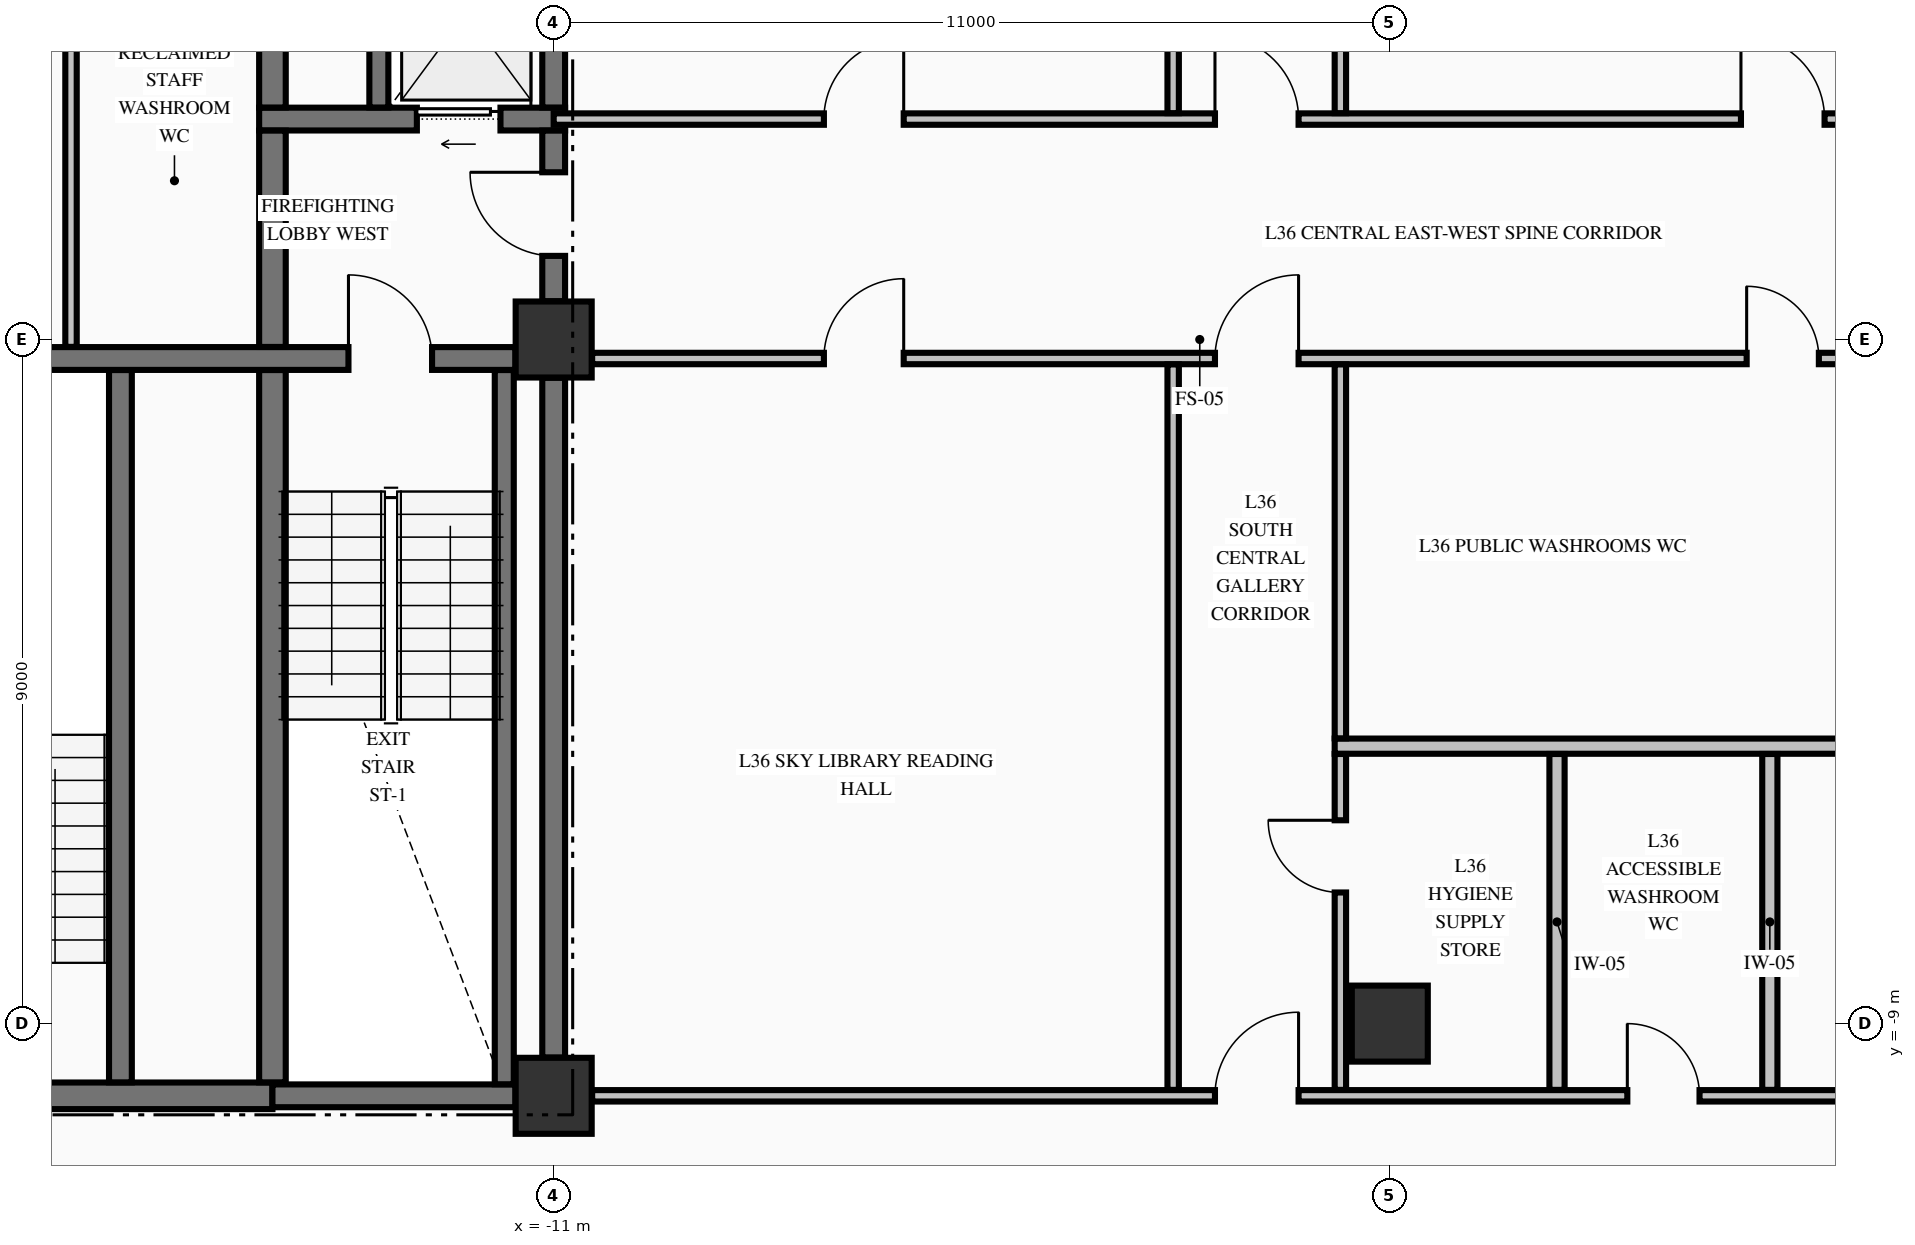
"""IFC4 building model, lengths in metres.
Left out: names, types, materials, properties, quantities, classifications, styles, units other than length and angle.
Written with IfcOpenShell. Run it as: python <this file> out.ifc"""

import sys

from ifc_helpers import new_model, si_unit, direction, frame, frame_2d, origin, origin_2d, place, context, subcontext, project, spatial, rectangle, extrude, element, fill, save


model = new_model("IFC4")
c1 = context("Model", 3, precision=1e-05, world=origin(), true_north=direction((0.0, 1.0)))
c2 = subcontext(c1, "Body", "Model", "MODEL_VIEW")
j1 = project(units=[si_unit("LENGTHUNIT", "METRE"), si_unit("PLANEANGLEUNIT", "RADIAN")], contexts=[c1])
p1 = place(None, origin())
s1 = spatial("IfcSite", under=j1, at=p1, CompositionType="ELEMENT")
p2 = place(p1, origin())
s2 = spatial("IfcBuilding", under=s1, at=p2, CompositionType="ELEMENT")
p3 = place(p2, frame((0.0, 0.0, 142.77)))
s3 = spatial("IfcBuildingStorey", under=s2, at=p3, CompositionType="ELEMENT", Elevation=142.77)
for number, where, z_axis, x_axis in (
    (1, (-11.0, -9.95, -0.325), (0.0, 0.0, 1.0), (1.0, 0.0, 0.0)),
    (2, (-11.0, 0.0, -0.325), (0.0, 0.0, 1.0), (1.0, 0.0, 0.0)),
    (3, (0.0, -9.0, -0.325), (0.0, 0.0, 1.0), (1.0, 0.0, 0.0)),
):
    element("IfcColumn", number, at=place(p3, frame(where, z_axis=z_axis, x_axis=x_axis)), inside=s3, PredefinedType="COLUMN", context=c2, shape_type="SweptSolid", body=[
        extrude(rectangle(XDim=1.0, YDim=1.0, at=origin_2d()), origin(), (0.0, 0.0, 1.0), 3.645),
    ])
p4 = place(p3, frame((-19.496, -9.95, 0.0), z_axis=(0.0, 0.0, 1.0), x_axis=(1.0, 0.0, 0.0)))
e4 = element("IfcWall", 4, at=p4, inside=s3, PredefinedType="SHEAR", context=c2, shape_type="SweptSolid", body=[
    extrude(rectangle(XDim=4.796, YDim=0.35, at=frame_2d((2.398, 0.0))), origin(), (0.0, 0.0, 1.0), 3.32),
])
p5 = place(p4, frame((0.671, 0.0, 0.0)))
e5 = element("IfcOpeningElement", 5, at=p5, cuts=e4, PredefinedType="OPENING", context=c2, shape_type="SweptSolid", body=[
    extrude(rectangle(XDim=1.05, YDim=2.15, at=frame_2d((0.525, 1.075))), frame((0.0, 0.185, 0.0), z_axis=(0.0, -1.0, 0.0), x_axis=(1.0, 0.0, 0.0)), (0.0, 0.0, 1.0), 0.37),
])
p6 = place(p3, frame((-14.7, -9.95, 0.0), z_axis=(0.0, 0.0, 1.0), x_axis=(1.0, 0.0, 0.0)))
e6 = element("IfcWall", 6, at=p6, inside=s3, PredefinedType="SHEAR", context=c2, shape_type="SweptSolid", body=[
    extrude(rectangle(XDim=3.196, YDim=0.3, at=frame_2d((1.598, 0.0))), origin(), (0.0, 0.0, 1.0), 3.32),
])
p7 = place(p3, frame((-19.496, -0.25, 0.0), z_axis=(0.0, 0.0, 1.0), x_axis=(1.0, 0.0, 0.0)))
e7 = element("IfcWall", 7, at=p7, inside=s3, PredefinedType="SHEAR", context=c2, shape_type="SweptSolid", body=[
    extrude(rectangle(XDim=7.992, YDim=0.3, at=frame_2d((3.996, 0.0))), origin(), (0.0, 0.0, 1.0), 3.32),
])
p8 = place(p7, frame((5.796, 0.0, 0.0)))
e8 = element("IfcOpeningElement", 8, at=p8, cuts=e7, PredefinedType="OPENING", context=c2, shape_type="SweptSolid", body=[
    extrude(rectangle(XDim=1.1, YDim=2.15, at=frame_2d((0.55, 1.075))), frame((0.0, 0.16, 0.0), z_axis=(0.0, -1.0, 0.0), x_axis=(1.0, 0.0, 0.0)), (0.0, 0.0, 1.0), 0.32),
])
p9 = place(p3, frame((-14.875, 2.9, 0.0), z_axis=(0.0, 0.0, 1.0), x_axis=(1.0, 0.0, 0.0)))
e9 = element("IfcWall", 9, at=p9, inside=s3, PredefinedType="SHEAR", context=c2, shape_type="SweptSolid", body=[
    extrude(rectangle(XDim=4.025, YDim=0.3, at=frame_2d((2.012, 0.0))), origin(), (0.0, 0.0, 1.0), 3.32),
])
p10 = place(p9, frame((2.075, 0.0, 0.0)))
e10 = element("IfcOpeningElement", 10, at=p10, cuts=e9, PredefinedType="OPENING", context=c2, shape_type="SweptSolid", body=[
    extrude(rectangle(XDim=1.1, YDim=2.2, at=frame_2d((0.55, 1.1))), frame((0.0, 0.16, 0.0), z_axis=(0.0, -1.0, 0.0), x_axis=(1.0, 0.0, 0.0)), (0.0, 0.0, 1.0), 0.32),
])
p11 = place(p3, frame((-10.494, -9.95, 0.0), z_axis=(0.0, 0.0, 1.0), x_axis=(1.0, 0.0, 0.0)))
e11 = element("IfcWall", 11, at=p11, inside=s3, PredefinedType="PARTITIONING", context=c2, shape_type="SweptSolid", body=[
    extrude(rectangle(XDim=20.988, YDim=0.15, at=frame_2d((10.494, 0.0))), origin(), (0.0, 0.0, 1.0), 3.32),
])
p12 = place(p11, frame((8.194, 0.0, 0.0)))
e12 = element("IfcOpeningElement", 12, at=p12, cuts=e11, PredefinedType="OPENING", context=c2, shape_type="SweptSolid", body=[
    extrude(rectangle(XDim=1.1, YDim=2.15, at=frame_2d((0.55, 1.075))), frame((0.0, 0.085, 0.0), z_axis=(0.0, -1.0, 0.0), x_axis=(1.0, 0.0, 0.0)), (0.0, 0.0, 1.0), 0.17),
])
p13 = place(p11, frame((13.619, 0.0, 0.0)))
e13 = element("IfcOpeningElement", 13, at=p13, cuts=e11, PredefinedType="OPENING", context=c2, shape_type="SweptSolid", body=[
    extrude(rectangle(XDim=0.95, YDim=2.15, at=frame_2d((0.475, 1.075))), frame((0.0, 0.085, 0.0), z_axis=(0.0, -1.0, 0.0), x_axis=(1.0, 0.0, 0.0)), (0.0, 0.0, 1.0), 0.17),
])
p14 = place(p11, frame((17.844, 0.0, 0.0)))
e14 = element("IfcOpeningElement", 14, at=p14, cuts=e11, PredefinedType="OPENING", context=c2, shape_type="SweptSolid", body=[
    extrude(rectangle(XDim=0.9, YDim=2.15, at=frame_2d((0.45, 1.075))), frame((0.0, 0.085, 0.0), z_axis=(0.0, -1.0, 0.0), x_axis=(1.0, 0.0, 0.0)), (0.0, 0.0, 1.0), 0.17),
])
p15 = place(p3, frame((-0.725, -5.35, 0.0), z_axis=(0.0, 0.0, 1.0), x_axis=(1.0, 0.0, 0.0)))
e15 = element("IfcWall", 15, at=p15, inside=s3, PredefinedType="PARTITIONING", context=c2, shape_type="SweptSolid", body=[
    extrude(rectangle(XDim=11.572, YDim=0.2, at=frame_2d((5.786, 0.0))), origin(), (0.0, 0.0, 1.0), 3.32),
])
p16 = place(p3, frame((-10.494, -0.25, 0.0), z_axis=(0.0, 0.0, 1.0), x_axis=(1.0, 0.0, 0.0)))
e16 = element("IfcWall", 16, at=p16, inside=s3, PredefinedType="PARTITIONING", context=c2, shape_type="SweptSolid", body=[
    extrude(rectangle(XDim=20.988, YDim=0.15, at=frame_2d((10.494, 0.0))), origin(), (0.0, 0.0, 1.0), 3.32),
])
p17 = place(p16, frame((8.194, 0.0, 0.0)))
e17 = element("IfcOpeningElement", 17, at=p17, cuts=e16, PredefinedType="OPENING", context=c2, shape_type="SweptSolid", body=[
    extrude(rectangle(XDim=1.1, YDim=2.15, at=frame_2d((0.55, 1.075))), frame((0.0, 0.085, 0.0), z_axis=(0.0, -1.0, 0.0), x_axis=(1.0, 0.0, 0.0)), (0.0, 0.0, 1.0), 0.17),
])
p18 = place(p16, frame((3.049, 0.0, 0.0)))
e18 = element("IfcOpeningElement", 18, at=p18, cuts=e16, PredefinedType="OPENING", context=c2, shape_type="SweptSolid", body=[
    extrude(rectangle(XDim=1.05, YDim=2.15, at=frame_2d((0.525, 1.075))), frame((0.0, 0.085, 0.0), z_axis=(0.0, -1.0, 0.0), x_axis=(1.0, 0.0, 0.0)), (0.0, 0.0, 1.0), 0.17),
])
p19 = place(p16, frame((15.189, 0.0, 0.0)))
e19 = element("IfcOpeningElement", 19, at=p19, cuts=e16, PredefinedType="OPENING", context=c2, shape_type="SweptSolid", body=[
    extrude(rectangle(XDim=0.95, YDim=2.15, at=frame_2d((0.475, 1.075))), frame((0.0, 0.085, 0.0), z_axis=(0.0, -1.0, 0.0), x_axis=(1.0, 0.0, 0.0)), (0.0, 0.0, 1.0), 0.17),
])
p20 = place(p3, frame((-11.0, 2.9, 0.0), z_axis=(0.0, 0.0, 1.0), x_axis=(1.0, 0.0, 0.0)))
e20 = element("IfcWall", 20, at=p20, inside=s3, PredefinedType="PARTITIONING", context=c2, shape_type="SweptSolid", body=[
    extrude(rectangle(XDim=22.0, YDim=0.15, at=frame_2d((11.0, 0.0))), origin(), (0.0, 0.0, 1.0), 3.32),
])
p21 = place(p20, frame((8.7, 0.0, 0.0)))
e21 = element("IfcOpeningElement", 21, at=p21, cuts=e20, PredefinedType="OPENING", context=c2, shape_type="SweptSolid", body=[
    extrude(rectangle(XDim=1.1, YDim=2.15, at=frame_2d((0.55, 1.075))), frame((0.0, 0.085, 0.0), z_axis=(0.0, -1.0, 0.0), x_axis=(1.0, 0.0, 0.0)), (0.0, 0.0, 1.0), 0.17),
])
p22 = place(p20, frame((3.555, 0.0, 0.0)))
e22 = element("IfcOpeningElement", 22, at=p22, cuts=e20, PredefinedType="OPENING", context=c2, shape_type="SweptSolid", body=[
    extrude(rectangle(XDim=1.05, YDim=2.15, at=frame_2d((0.525, 1.075))), frame((0.0, 0.085, 0.0), z_axis=(0.0, -1.0, 0.0), x_axis=(1.0, 0.0, 0.0)), (0.0, 0.0, 1.0), 0.17),
])
p23 = place(p20, frame((15.62, 0.0, 0.0)))
e23 = element("IfcOpeningElement", 23, at=p23, cuts=e20, PredefinedType="OPENING", context=c2, shape_type="SweptSolid", body=[
    extrude(rectangle(XDim=1.1, YDim=2.15, at=frame_2d((0.55, 1.075))), frame((0.0, 0.085, 0.0), z_axis=(0.0, -1.0, 0.0), x_axis=(1.0, 0.0, 0.0)), (0.0, 0.0, 1.0), 0.17),
])
p24 = place(p3, frame((-16.7, -9.773, 0.0), z_axis=(0.0, 0.0, 1.0), x_axis=(0.0, 1.0, 0.0)))
e24 = element("IfcWall", 24, at=p24, inside=s3, PredefinedType="SHEAR", context=c2, shape_type="SweptSolid", body=[
    extrude(rectangle(XDim=9.371, YDim=0.3, at=frame_2d((4.686, 0.0))), origin(), (0.0, 0.0, 1.0), 3.32),
])
p25 = place(p3, frame((-14.7, -9.773, 0.0), z_axis=(0.0, 0.0, 1.0), x_axis=(0.0, 1.0, 0.0)))
e25 = element("IfcWall", 25, at=p25, inside=s3, PredefinedType="SHEAR", context=c2, shape_type="SweptSolid", body=[
    extrude(rectangle(XDim=9.371, YDim=0.35, at=frame_2d((4.686, 0.0))), origin(), (0.0, 0.0, 1.0), 3.32),
])
p26 = place(p3, frame((-14.7, -0.098, 0.0), z_axis=(0.0, 0.0, 1.0), x_axis=(0.0, 1.0, 0.0)))
e26 = element("IfcWall", 26, at=p26, inside=s3, PredefinedType="SHEAR", context=c2, shape_type="SweptSolid", body=[
    extrude(rectangle(XDim=2.846, YDim=0.35, at=frame_2d((1.423, 0.0))), origin(), (0.0, 0.0, 1.0), 3.32),
])
p27 = place(p3, frame((-14.7, 3.052, 0.0), z_axis=(0.0, 0.0, 1.0), x_axis=(0.0, 1.0, 0.0)))
e27 = element("IfcWall", 27, at=p27, inside=s3, PredefinedType="SHEAR", context=c2, shape_type="SweptSolid", body=[
    extrude(rectangle(XDim=2.496, YDim=0.35, at=frame_2d((1.248, 0.0))), origin(), (0.0, 0.0, 1.0), 3.32),
])
p28 = place(p3, frame((-13.3, 3.052, 0.0), z_axis=(0.0, 0.0, 1.0), x_axis=(0.0, 1.0, 0.0)))
e28 = element("IfcWall", 28, at=p28, inside=s3, PredefinedType="SOLIDWALL", context=c2, shape_type="SweptSolid", body=[
    extrude(rectangle(XDim=2.496, YDim=0.25, at=frame_2d((1.248, 0.0))), origin(), (0.0, 0.0, 1.0), 3.32),
])
p29 = place(p3, frame((-11.65, -9.798, 0.0), z_axis=(0.0, 0.0, 1.0), x_axis=(0.0, 1.0, 0.0)))
e29 = element("IfcWall", 29, at=p29, inside=s3, PredefinedType="SOLIDWALL", context=c2, shape_type="SweptSolid", body=[
    extrude(rectangle(XDim=9.396, YDim=0.25, at=frame_2d((4.698, 0.0))), origin(), (0.0, 0.0, 1.0), 3.32),
])
p30 = place(p3, frame((-11.0, -9.446, 0.0), z_axis=(0.0, 0.0, 1.0), x_axis=(0.0, 1.0, 0.0)))
e30 = element("IfcWall", 30, at=p30, inside=s3, PredefinedType="SHEAR", context=c2, shape_type="SweptSolid", body=[
    extrude(rectangle(XDim=8.942, YDim=0.3, at=frame_2d((4.471, 0.0))), origin(), (0.0, 0.0, 1.0), 3.32),
])
p31 = place(p3, frame((-11.0, 0.504, 0.0), z_axis=(0.0, 0.0, 1.0), x_axis=(0.0, 1.0, 0.0)))
e31 = element("IfcWall", 31, at=p31, inside=s3, PredefinedType="SHEAR", context=c2, shape_type="SweptSolid", body=[
    extrude(rectangle(XDim=2.244, YDim=0.3, at=frame_2d((1.122, 0.0))), origin(), (0.0, 0.0, 1.0), 3.32),
])
p32 = place(p31, frame((0.596, 0.0, 0.0)))
e32 = element("IfcOpeningElement", 32, at=p32, cuts=e31, PredefinedType="OPENING", context=c2, shape_type="SweptSolid", body=[
    extrude(rectangle(XDim=1.1, YDim=2.15, at=frame_2d((0.55, 1.075))), frame((0.0, 0.16, 0.0), z_axis=(0.0, -1.0, 0.0), x_axis=(1.0, 0.0, 0.0)), (0.0, 0.0, 1.0), 0.32),
])
p33 = place(p3, frame((-11.0, 3.052, 0.0), z_axis=(0.0, 0.0, 1.0), x_axis=(0.0, 1.0, 0.0)))
e33 = element("IfcWall", 33, at=p33, inside=s3, PredefinedType="SHEAR", context=c2, shape_type="SweptSolid", body=[
    extrude(rectangle(XDim=2.496, YDim=0.3, at=frame_2d((1.248, 0.0))), origin(), (0.0, 0.0, 1.0), 3.32),
])
p34 = place(p3, frame((-17.35, -0.097, 0.0), z_axis=(0.0, 0.0, 1.0), x_axis=(0.0, 1.0, 0.0)))
e34 = element("IfcWall", 34, at=p34, inside=s3, PredefinedType="PARTITIONING", context=c2, shape_type="SweptSolid", body=[
    extrude(rectangle(XDim=5.119, YDim=0.15, at=frame_2d((2.56, 0.0))), origin(), (0.0, 0.0, 1.0), 3.32),
])
p35 = place(p3, frame((-2.85, -9.872, 0.0), z_axis=(0.0, 0.0, 1.0), x_axis=(0.0, 1.0, 0.0)))
e35 = element("IfcWall", 35, at=p35, inside=s3, PredefinedType="PARTITIONING", context=c2, shape_type="SweptSolid", body=[
    extrude(rectangle(XDim=9.544, YDim=0.15, at=frame_2d((4.772, 0.0))), origin(), (0.0, 0.0, 1.0), 3.32),
])
p36 = place(p3, frame((-2.85, 2.978, 0.0), z_axis=(0.0, 0.0, 1.0), x_axis=(0.0, 1.0, 0.0)))
e36 = element("IfcWall", 36, at=p36, inside=s3, PredefinedType="PARTITIONING", context=c2, shape_type="SweptSolid", body=[
    extrude(rectangle(XDim=7.444, YDim=0.15, at=frame_2d((3.722, 0.0))), origin(), (0.0, 0.0, 1.0), 3.32),
])
p37 = place(p3, frame((-0.65, -9.872, 0.0), z_axis=(0.0, 0.0, 1.0), x_axis=(0.0, 1.0, 0.0)))
e37 = element("IfcWall", 37, at=p37, inside=s3, PredefinedType="PARTITIONING", context=c2, shape_type="SweptSolid", body=[
    extrude(rectangle(XDim=4.419, YDim=0.15, at=frame_2d((2.209, 0.0))), origin(), (0.0, 0.0, 1.0), 3.32),
])
p38 = place(p37, frame((2.597, 0.0, 0.0)))
e38 = element("IfcOpeningElement", 38, at=p38, cuts=e37, PredefinedType="OPENING", context=c2, shape_type="SweptSolid", body=[
    extrude(rectangle(XDim=0.95, YDim=2.15, at=frame_2d((0.475, 1.075))), frame((0.0, 0.085, 0.0), z_axis=(0.0, -1.0, 0.0), x_axis=(1.0, 0.0, 0.0)), (0.0, 0.0, 1.0), 0.17),
])
p39 = place(p3, frame((-0.65, -5.247, 0.0), z_axis=(0.0, 0.0, 1.0), x_axis=(0.0, 1.0, 0.0)))
e39 = element("IfcWall", 39, at=p39, inside=s3, PredefinedType="PARTITIONING", context=c2, shape_type="SweptSolid", body=[
    extrude(rectangle(XDim=4.919, YDim=0.15, at=frame_2d((2.459, 0.0))), origin(), (0.0, 0.0, 1.0), 3.32),
])
p40 = place(p3, frame((-0.65, 2.978, 0.0), z_axis=(0.0, 0.0, 1.0), x_axis=(0.0, 1.0, 0.0)))
e40 = element("IfcWall", 40, at=p40, inside=s3, PredefinedType="PARTITIONING", context=c2, shape_type="SweptSolid", body=[
    extrude(rectangle(XDim=7.444, YDim=0.15, at=frame_2d((3.722, 0.0))), origin(), (0.0, 0.0, 1.0), 3.32),
])
for number, where, z_axis, x_axis in (
    (41, (2.2, -9.872, 0.0), (0.0, 0.0, 1.0), (0.0, 1.0, 0.0)),
    (42, (5.0, -9.872, 0.0), (0.0, 0.0, 1.0), (0.0, 1.0, 0.0)),
):
    element("IfcWall", number, at=place(p3, frame(where, z_axis=z_axis, x_axis=x_axis)), inside=s3, PredefinedType="PARTITIONING", context=c2, shape_type="SweptSolid", body=[
        extrude(rectangle(XDim=4.419, YDim=0.2, at=frame_2d((2.209, 0.0))), origin(), (0.0, 0.0, 1.0), 3.32),
    ])
p41 = place(p8, origin())
e43 = element("IfcDoor", 43, at=p41, inside=s3, OperationType="SINGLE_SWING_LEFT", PredefinedType="DOOR", context=c2, shape_type="SweptSolid", body=[
    extrude(rectangle(XDim=1.1, YDim=2.15, at=frame_2d((0.55, 1.075))), frame((0.0, 0.025, 0.0), z_axis=(0.0, -1.0, 0.0), x_axis=(1.0, 0.0, 0.0)), (0.0, 0.0, 1.0), 0.05),
])
fill(e8, e43)
p42 = place(p32, origin())
e44 = element("IfcDoor", 44, at=p42, inside=s3, OperationType="SINGLE_SWING_RIGHT", PredefinedType="DOOR", context=c2, shape_type="SweptSolid", body=[
    extrude(rectangle(XDim=1.1, YDim=2.15, at=frame_2d((0.55, 1.075))), frame((0.0, 0.025, 0.0), z_axis=(0.0, -1.0, 0.0), x_axis=(1.0, 0.0, 0.0)), (0.0, 0.0, 1.0), 0.05),
])
fill(e32, e44)
p43 = place(p10, origin())
e45 = element("IfcDoor", 45, at=p43, inside=s3, OperationType="SLIDING_TO_LEFT", PredefinedType="DOOR", context=c2, shape_type="SweptSolid", body=[
    extrude(rectangle(XDim=1.1, YDim=2.2, at=frame_2d((0.55, 1.1))), frame((0.0, 0.025, 0.0), z_axis=(0.0, -1.0, 0.0), x_axis=(1.0, 0.0, 0.0)), (0.0, 0.0, 1.0), 0.05),
])
fill(e10, e45)
p44 = place(p12, origin())
e46 = element("IfcDoor", 46, at=p44, inside=s3, OperationType="SINGLE_SWING_RIGHT", PredefinedType="DOOR", context=c2, shape_type="SweptSolid", body=[
    extrude(rectangle(XDim=1.1, YDim=2.15, at=frame_2d((0.55, 1.075))), frame((0.0, 0.025, 0.0), z_axis=(0.0, -1.0, 0.0), x_axis=(1.0, 0.0, 0.0)), (0.0, 0.0, 1.0), 0.05),
])
fill(e12, e46)
p45 = place(p21, origin())
e47 = element("IfcDoor", 47, at=p45, inside=s3, OperationType="SINGLE_SWING_LEFT", PredefinedType="DOOR", context=c2, shape_type="SweptSolid", body=[
    extrude(rectangle(XDim=1.1, YDim=2.15, at=frame_2d((0.55, 1.075))), frame((0.0, 0.025, 0.0), z_axis=(0.0, -1.0, 0.0), x_axis=(1.0, 0.0, 0.0)), (0.0, 0.0, 1.0), 0.05),
])
fill(e21, e47)
p46 = place(p17, origin())
e48 = element("IfcDoor", 48, at=p46, inside=s3, OperationType="SINGLE_SWING_RIGHT", PredefinedType="DOOR", context=c2, shape_type="SweptSolid", body=[
    extrude(rectangle(XDim=1.1, YDim=2.15, at=frame_2d((0.55, 1.075))), frame((0.0, 0.025, 0.0), z_axis=(0.0, -1.0, 0.0), x_axis=(1.0, 0.0, 0.0)), (0.0, 0.0, 1.0), 0.05),
])
fill(e17, e48)
p47 = place(p22, origin())
e49 = element("IfcDoor", 49, at=p47, inside=s3, OperationType="SINGLE_SWING_RIGHT", PredefinedType="DOOR", context=c2, shape_type="SweptSolid", body=[
    extrude(rectangle(XDim=1.05, YDim=2.15, at=frame_2d((0.525, 1.075))), frame((0.0, 0.025, 0.0), z_axis=(0.0, -1.0, 0.0), x_axis=(1.0, 0.0, 0.0)), (0.0, 0.0, 1.0), 0.05),
])
fill(e22, e49)
p48 = place(p23, origin())
e50 = element("IfcDoor", 50, at=p48, inside=s3, OperationType="SINGLE_SWING_LEFT", PredefinedType="DOOR", context=c2, shape_type="SweptSolid", body=[
    extrude(rectangle(XDim=1.1, YDim=2.15, at=frame_2d((0.55, 1.075))), frame((0.0, 0.025, 0.0), z_axis=(0.0, -1.0, 0.0), x_axis=(1.0, 0.0, 0.0)), (0.0, 0.0, 1.0), 0.05),
])
fill(e23, e50)
p49 = place(p18, origin())
e51 = element("IfcDoor", 51, at=p49, inside=s3, OperationType="SINGLE_SWING_RIGHT", PredefinedType="DOOR", context=c2, shape_type="SweptSolid", body=[
    extrude(rectangle(XDim=1.05, YDim=2.15, at=frame_2d((0.525, 1.075))), frame((0.0, 0.025, 0.0), z_axis=(0.0, -1.0, 0.0), x_axis=(1.0, 0.0, 0.0)), (0.0, 0.0, 1.0), 0.05),
])
fill(e18, e51)
p50 = place(p19, origin())
e52 = element("IfcDoor", 52, at=p50, inside=s3, OperationType="SINGLE_SWING_LEFT", PredefinedType="DOOR", context=c2, shape_type="SweptSolid", body=[
    extrude(rectangle(XDim=0.95, YDim=2.15, at=frame_2d((0.475, 1.075))), frame((0.0, 0.025, 0.0), z_axis=(0.0, -1.0, 0.0), x_axis=(1.0, 0.0, 0.0)), (0.0, 0.0, 1.0), 0.05),
])
fill(e19, e52)
p51 = place(p38, origin())
e53 = element("IfcDoor", 53, at=p51, inside=s3, OperationType="SINGLE_SWING_RIGHT", PredefinedType="DOOR", context=c2, shape_type="SweptSolid", body=[
    extrude(rectangle(XDim=0.95, YDim=2.15, at=frame_2d((0.475, 1.075))), frame((0.0, 0.025, 0.0), z_axis=(0.0, -1.0, 0.0), x_axis=(1.0, 0.0, 0.0)), (0.0, 0.0, 1.0), 0.05),
])
fill(e38, e53)
p52 = place(p13, origin())
e54 = element("IfcDoor", 54, at=p52, inside=s3, OperationType="SINGLE_SWING_LEFT", PredefinedType="DOOR", context=c2, shape_type="SweptSolid", body=[
    extrude(rectangle(XDim=0.95, YDim=2.15, at=frame_2d((0.475, 1.075))), frame((0.0, 0.025, 0.0), z_axis=(0.0, -1.0, 0.0), x_axis=(1.0, 0.0, 0.0)), (0.0, 0.0, 1.0), 0.05),
])
fill(e13, e54)
save(model, sys.argv[1])
